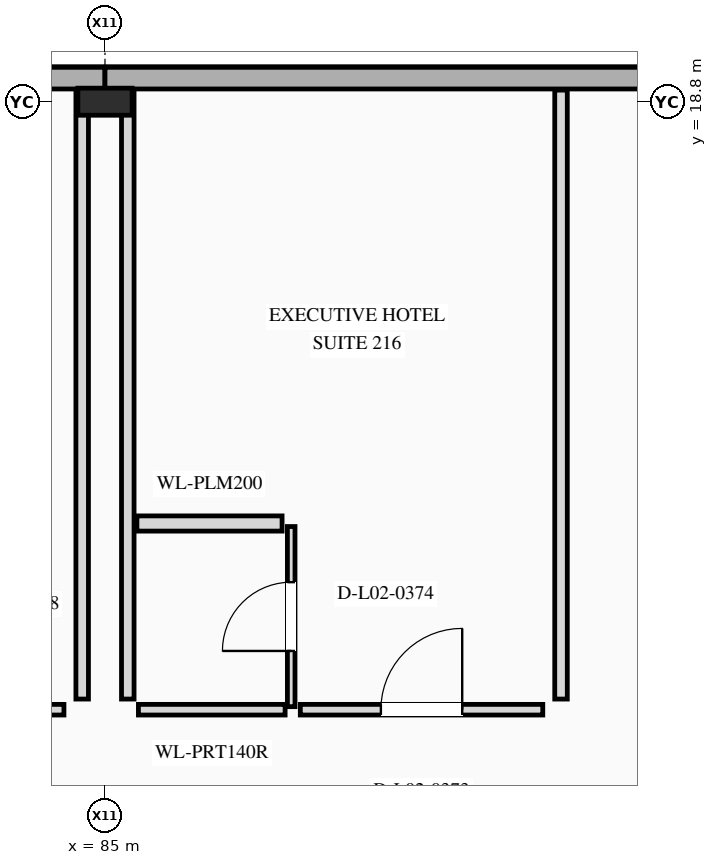
"""IFC4 building model, lengths in metres.
Left out: names, types, materials, properties, quantities, classifications, styles, units other than length and angle.
Written with IfcOpenShell. Run it as: python <this file> out.ifc"""

import sys

from ifc_helpers import new_model, si_unit, direction, frame, frame_2d, origin, origin_2d, place, context, subcontext, project, spatial, rectangle, i_section, extrude, element, fill, save


model = new_model("IFC4")
c1 = context("Model", 3, precision=1e-05, world=origin(), true_north=direction((0.0, 1.0)))
c2 = subcontext(c1, "Body", "Model", "MODEL_VIEW")
j1 = project(units=[si_unit("LENGTHUNIT", "METRE"), si_unit("PLANEANGLEUNIT", "RADIAN")], contexts=[c1])
p1 = place(None, origin())
s1 = spatial("IfcSite", under=j1, at=p1, CompositionType="ELEMENT")
p2 = place(p1, origin())
s2 = spatial("IfcBuilding", under=s1, at=p2, CompositionType="ELEMENT")
p3 = place(p2, frame((0.0, 0.0, 10.8)))
s3 = spatial("IfcBuildingStorey", under=s2, at=p3, CompositionType="ELEMENT", Elevation=10.8)
p4 = place(p3, frame((85.0, 18.8, 0.0), z_axis=(0.0, 0.0, 1.0), x_axis=(0.0, 1.0, 0.0)))
e1 = element("IfcColumn", 1, at=p4, inside=s3, PredefinedType="COLUMN", context=c2, shape_type="SweptSolid", body=[
    extrude(i_section(OverallWidth=0.356, OverallDepth=0.714, WebThickness=0.019, FlangeThickness=0.034, at=origin_2d()), origin(), (0.0, 0.0, 1.0), 4.8),
])
p5 = place(p3, frame((85.0, 19.11, 0.0), z_axis=(0.0, 0.0, 1.0), x_axis=(-1.0, 0.0, 0.0)))
e2 = element("IfcWall", 2, at=p5, inside=s3, PredefinedType="STANDARD", context=c2, shape_type="SweptSolid", body=[
    extrude(rectangle(XDim=9.0, YDim=0.285, at=frame_2d((4.5, 0.0))), origin(), (0.0, 0.0, 1.0), 4.8),
])
p6 = place(p5, frame((5.45, 0.0, 0.85)))
e3 = element("IfcOpeningElement", 3, at=p6, cuts=e2, PredefinedType="OPENING", context=c2, shape_type="SweptSolid", body=[
    extrude(rectangle(XDim=2.3, YDim=1.7, at=frame_2d((1.15, 0.85))), frame((0.0, 0.152, 0.0), z_axis=(0.0, -1.0, 0.0), x_axis=(1.0, 0.0, 0.0)), (0.0, 0.0, 1.0), 0.305),
])
p7 = place(p5, frame((1.15, 0.0, 0.85)))
e4 = element("IfcOpeningElement", 4, at=p7, cuts=e2, PredefinedType="OPENING", context=c2, shape_type="SweptSolid", body=[
    extrude(rectangle(XDim=2.5, YDim=1.75, at=frame_2d((1.25, 0.875))), frame((0.0, 0.152, 0.0), z_axis=(0.0, -1.0, 0.0), x_axis=(1.0, 0.0, 0.0)), (0.0, 0.0, 1.0), 0.305),
])
p8 = place(p3, frame((94.0, 19.11, 0.0), z_axis=(0.0, 0.0, 1.0), x_axis=(-1.0, 0.0, 0.0)))
e5 = element("IfcWall", 5, at=p8, inside=s3, PredefinedType="STANDARD", context=c2, shape_type="SweptSolid", body=[
    extrude(rectangle(XDim=9.0, YDim=0.285, at=frame_2d((4.5, 0.0))), origin(), (0.0, 0.0, 1.0), 4.8),
])
p9 = place(p3, frame((82.51, 10.8, 0.0), z_axis=(0.0, 0.0, 1.0), x_axis=(1.0, 0.0, 0.0)))
e6 = element("IfcWall", 6, at=p9, inside=s3, PredefinedType="PARTITIONING", context=c2, shape_type="SweptSolid", body=[
    extrude(rectangle(XDim=1.95, YDim=0.14, at=frame_2d((0.975, 0.0))), origin(), (0.0, 0.0, 1.0), 4.475),
])
p10 = place(p9, frame((0.485, 0.0, 0.0)))
e7 = element("IfcOpeningElement", 7, at=p10, cuts=e6, PredefinedType="OPENING", context=c2, shape_type="SweptSolid", body=[
    extrude(rectangle(XDim=0.98, YDim=2.2, at=frame_2d((0.49, 1.1))), frame((0.0, 0.08, 0.0), z_axis=(0.0, -1.0, 0.0), x_axis=(1.0, 0.0, 0.0)), (0.0, 0.0, 1.0), 0.16),
])
p11 = place(p3, frame((84.7, 10.94, 0.0), z_axis=(0.0, 0.0, 1.0), x_axis=(0.0, 1.0, 0.0)))
e8 = element("IfcWall", 8, at=p11, inside=s3, PredefinedType="PARTITIONING", context=c2, shape_type="SweptSolid", body=[
    extrude(rectangle(XDim=8.012, YDim=0.165, at=frame_2d((4.006, 0.0))), origin(), (0.0, 0.0, 1.0), 3.804),
])
p12 = place(p3, frame((85.44, 10.8, 0.0), z_axis=(0.0, 0.0, 1.0), x_axis=(1.0, 0.0, 0.0)))
e9 = element("IfcWall", 9, at=p12, inside=s3, PredefinedType="PARTITIONING", context=c2, shape_type="SweptSolid", body=[
    extrude(rectangle(XDim=1.93, YDim=0.14, at=frame_2d((0.965, 0.0))), origin(), (0.0, 0.0, 1.0), 4.475),
])
p13 = place(p3, frame((87.57, 10.8, 0.0), z_axis=(0.0, 0.0, 1.0), x_axis=(1.0, 0.0, 0.0)))
e10 = element("IfcWall", 10, at=p13, inside=s3, PredefinedType="PARTITIONING", context=c2, shape_type="SweptSolid", body=[
    extrude(rectangle(XDim=3.19, YDim=0.14, at=frame_2d((1.595, 0.0))), origin(), (0.0, 0.0, 1.0), 4.475),
])
p14 = place(p13, frame((1.06, 0.0, 0.0)))
e11 = element("IfcOpeningElement", 11, at=p14, cuts=e10, PredefinedType="OPENING", context=c2, shape_type="SweptSolid", body=[
    extrude(rectangle(XDim=1.07, YDim=2.25, at=frame_2d((0.535, 1.125))), frame((0.0, 0.08, 0.0), z_axis=(0.0, -1.0, 0.0), x_axis=(1.0, 0.0, 0.0)), (0.0, 0.0, 1.0), 0.16),
])
p15 = place(p3, frame((85.3, 10.94, 0.0), z_axis=(0.0, 0.0, 1.0), x_axis=(0.0, 1.0, 0.0)))
e12 = element("IfcWall", 12, at=p15, inside=s3, PredefinedType="PARTITIONING", context=c2, shape_type="SweptSolid", body=[
    extrude(rectangle(XDim=8.012, YDim=0.165, at=frame_2d((4.006, 0.0))), origin(), (0.0, 0.0, 1.0), 3.804),
])
p16 = place(p3, frame((91.0, 10.94, 0.0), z_axis=(0.0, 0.0, 1.0), x_axis=(0.0, 1.0, 0.0)))
e13 = element("IfcWall", 13, at=p16, inside=s3, PredefinedType="PARTITIONING", context=c2, shape_type="SweptSolid", body=[
    extrude(rectangle(XDim=8.012, YDim=0.165, at=frame_2d((4.006, 0.0))), origin(), (0.0, 0.0, 1.0), 4.475),
])
p17 = place(p3, frame((87.45, 10.84, 0.0), z_axis=(0.0, 0.0, 1.0), x_axis=(0.0, 1.0, 0.0)))
e14 = element("IfcWall", 14, at=p17, inside=s3, PredefinedType="PARTITIONING", context=c2, shape_type="SweptSolid", body=[
    extrude(rectangle(XDim=2.37, YDim=0.1, at=frame_2d((1.185, 0.0))), origin(), (0.0, 0.0, 1.0), 4.475),
])
p18 = place(p17, frame((0.733, 0.0, 0.0)))
e15 = element("IfcOpeningElement", 15, at=p18, cuts=e14, PredefinedType="OPENING", context=c2, shape_type="SweptSolid", body=[
    extrude(rectangle(XDim=0.905, YDim=2.1, at=frame_2d((0.453, 1.05))), frame((0.0, 0.06, 0.0), z_axis=(0.0, -1.0, 0.0), x_axis=(1.0, 0.0, 0.0)), (0.0, 0.0, 1.0), 0.12),
])
p19 = place(p3, frame((85.42, 13.25, 0.0), z_axis=(0.0, 0.0, 1.0), x_axis=(1.0, 0.0, 0.0)))
e16 = element("IfcWall", 16, at=p19, inside=s3, PredefinedType="PLUMBINGWALL", context=c2, shape_type="SweptSolid", body=[
    extrude(rectangle(XDim=1.91, YDim=0.2, at=frame_2d((0.955, 0.0))), origin(), (0.0, 0.0, 1.0), 4.475),
])
p20 = place(p14, origin())
e17 = element("IfcDoor", 17, at=p20, inside=s3, OperationType="SINGLE_SWING_RIGHT", PredefinedType="DOOR", context=c2, shape_type="SweptSolid", body=[
    extrude(rectangle(XDim=1.07, YDim=2.25, at=frame_2d((0.535, 1.125))), frame((0.0, 0.025, 0.0), z_axis=(0.0, -1.0, 0.0), x_axis=(1.0, 0.0, 0.0)), (0.0, 0.0, 1.0), 0.05),
])
fill(e11, e17)
p21 = place(p18, origin())
e18 = element("IfcDoor", 18, at=p21, inside=s3, OperationType="SINGLE_SWING_LEFT", PredefinedType="DOOR", context=c2, shape_type="SweptSolid", body=[
    extrude(rectangle(XDim=0.905, YDim=2.1, at=frame_2d((0.453, 1.05))), frame((0.0, 0.025, 0.0), z_axis=(0.0, -1.0, 0.0), x_axis=(1.0, 0.0, 0.0)), (0.0, 0.0, 1.0), 0.05),
])
fill(e15, e18)
save(model, sys.argv[1])
